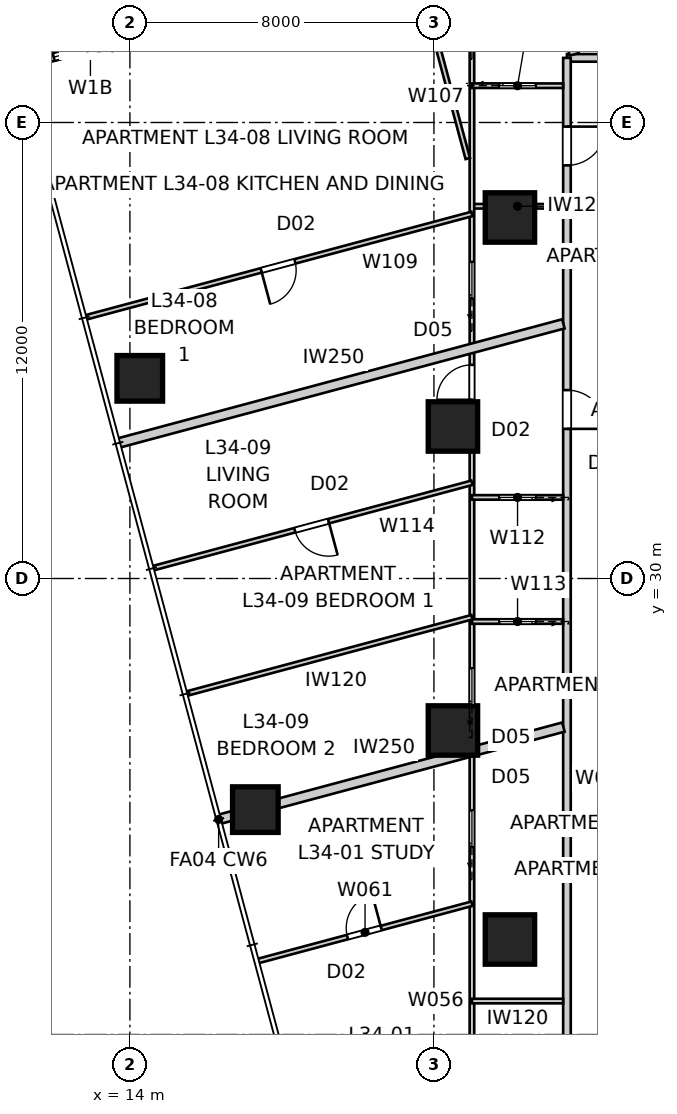
"""IFC4 building model, lengths in metres.
Left out: names, types, materials, properties, quantities, classifications, styles, units other than length and angle.
Written with IfcOpenShell. Run it as: python <this file> out.ifc"""

import sys

from ifc_helpers import new_model, si_unit, direction, frame, frame_2d, origin, origin_2d, place, context, subcontext, project, spatial, rectangle, extrude, element, fill, save


model = new_model("IFC4")
c1 = context("Model", 3, precision=1e-05, world=origin(), true_north=direction((0.0, 1.0)))
c2 = subcontext(c1, "Body", "Model", "MODEL_VIEW")
j1 = project(units=[si_unit("LENGTHUNIT", "METRE"), si_unit("PLANEANGLEUNIT", "RADIAN")], contexts=[c1])
p1 = place(None, origin())
s1 = spatial("IfcSite", under=j1, at=p1, CompositionType="ELEMENT")
p2 = place(p1, origin())
s2 = spatial("IfcBuilding", under=s1, at=p2, CompositionType="ELEMENT")
p3 = place(p2, frame((0.0, 0.0, 125.2)))
s3 = spatial("IfcBuildingStorey", under=s2, at=p3, CompositionType="ELEMENT", Elevation=125.2)
for number, where, z_axis, x_axis in (
    (1, (14.26, 35.267, 0.0), (0.0, 0.0, 1.0), (1.0, 0.0, 0.0)),
    (2, (17.301, 23.918, 0.0), (0.0, 0.0, 1.0), (1.0, 0.0, 0.0)),
):
    element("IfcColumn", number, at=place(p3, frame(where, z_axis=z_axis, x_axis=x_axis)), inside=s3, PredefinedType="COLUMN", context=c2, shape_type="SweptSolid", body=[
        extrude(rectangle(XDim=1.2, YDim=1.2, at=origin_2d()), origin(), (0.0, 0.0, 1.0), 3.4),
    ])
for number, where, z_axis, x_axis in (
    (3, (24.0, 39.5, 0.0), (0.0, 0.0, 1.0), (1.0, 0.0, 0.0)),
    (4, (22.5, 34.0, 0.0), (0.0, 0.0, 1.0), (1.0, 0.0, 0.0)),
    (5, (22.5, 26.0, 0.0), (0.0, 0.0, 1.0), (1.0, 0.0, 0.0)),
    (6, (24.0, 20.5, 0.0), (0.0, 0.0, 1.0), (1.0, 0.0, 0.0)),
):
    element("IfcColumn", number, at=place(p3, frame(where, z_axis=z_axis, x_axis=x_axis)), inside=s3, PredefinedType="COLUMN", context=c2, shape_type="SweptSolid", body=[
        extrude(rectangle(XDim=1.3, YDim=1.3, at=origin_2d()), origin(), (0.0, 0.0, 1.0), 3.4),
    ])
p4 = place(p3, frame((14.893, 44.496, 0.0), z_axis=(0.0, 0.0, 1.0), x_axis=(-0.965934430412, -0.258786931944, 0.0)))
e7 = element("IfcWall", 7, at=p4, inside=s3, PredefinedType="SOLIDWALL", context=c2, shape_type="SweptSolid", body=[
    extrude(rectangle(XDim=4.0, YDim=0.2, at=frame_2d((2.0, 0.0))), origin(), (0.0, 0.0, 1.0), 3.25),
])
p5 = place(p4, frame((1.0, 0.0, 0.45)))
e8 = element("IfcOpeningElement", 8, at=p5, cuts=e7, PredefinedType="OPENING", context=c2, shape_type="SweptSolid", body=[
    extrude(rectangle(XDim=2.0, YDim=1.8, at=frame_2d((1.0, 0.9))), frame((0.0, 0.11, 0.0), z_axis=(0.0, -1.0, 0.0), x_axis=(1.0, 0.0, 0.0)), (0.0, 0.0, 1.0), 0.22),
])
p6 = place(p3, frame((52.52, 43.7, 0.0), z_axis=(0.0, 0.0, 1.0), x_axis=(-1.0, 0.0, 0.0)))
e9 = element("IfcWall", 9, at=p6, inside=s3, PredefinedType="PARTITIONING", context=c2, shape_type="SweptSolid", body=[
    extrude(rectangle(XDim=27.02, YDim=0.2, at=frame_2d((13.51, 0.0))), origin(), (0.0, 0.0, 1.0), 3.25),
])
p7 = place(p6, frame((22.208, 0.0, 0.0)))
e10 = element("IfcOpeningElement", 10, at=p7, cuts=e9, PredefinedType="OPENING", context=c2, shape_type="SweptSolid", body=[
    extrude(rectangle(XDim=1.02, YDim=2.34, at=frame_2d((0.51, 1.17))), frame((0.0, 0.11, 0.0), z_axis=(0.0, -1.0, 0.0), x_axis=(1.0, 0.0, 0.0)), (0.0, 0.0, 1.0), 0.22),
])
p8 = place(p6, frame((1.856, 0.0, 0.0)))
e11 = element("IfcOpeningElement", 11, at=p8, cuts=e9, PredefinedType="OPENING", context=c2, shape_type="SweptSolid", body=[
    extrude(rectangle(XDim=1.02, YDim=2.34, at=frame_2d((0.51, 1.17))), frame((0.0, 0.11, 0.0), z_axis=(0.0, -1.0, 0.0), x_axis=(1.0, 0.0, 0.0)), (0.0, 0.0, 1.0), 0.22),
])
p9 = place(p3, frame((25.5, 43.7, 0.0), z_axis=(0.0, 0.0, 1.0), x_axis=(0.0, -1.0, 0.0)))
e12 = element("IfcWall", 12, at=p9, inside=s3, PredefinedType="PARTITIONING", context=c2, shape_type="SweptSolid", body=[
    extrude(rectangle(XDim=28.2, YDim=0.2, at=frame_2d((14.1, 0.0))), origin(), (0.0, 0.0, 1.0), 3.25),
])
p10 = place(p9, frame((8.742, 0.0, 0.0)))
e13 = element("IfcOpeningElement", 13, at=p10, cuts=e12, PredefinedType="OPENING", context=c2, shape_type="SweptSolid", body=[
    extrude(rectangle(XDim=1.02, YDim=2.34, at=frame_2d((0.51, 1.17))), frame((0.0, 0.11, 0.0), z_axis=(0.0, -1.0, 0.0), x_axis=(1.0, 0.0, 0.0)), (0.0, 0.0, 1.0), 0.22),
])
p11 = place(p9, frame((1.808, 0.0, 0.0)))
e14 = element("IfcOpeningElement", 14, at=p11, cuts=e12, PredefinedType="OPENING", context=c2, shape_type="SweptSolid", body=[
    extrude(rectangle(XDim=1.02, YDim=2.1, at=frame_2d((0.51, 1.05))), frame((0.0, 0.11, 0.0), z_axis=(0.0, -1.0, 0.0), x_axis=(1.0, 0.0, 0.0)), (0.0, 0.0, 1.0), 0.22),
])
p12 = place(p3, frame((23.758, 51.012, 0.0), z_axis=(0.0, 0.0, 1.0), x_axis=(0.258805213744, -0.965929532284, 0.0)))
e15 = element("IfcWall", 15, at=p12, inside=s3, PredefinedType="PARTITIONING", context=c2, shape_type="SweptSolid", body=[
    extrude(rectangle(XDim=7.473, YDim=0.25, at=frame_2d((3.737, 0.0))), origin(), (0.0, 0.0, 1.0), 3.25),
])
p13 = place(p3, frame((16.335, 23.659, 0.0), z_axis=(0.0, 0.0, 1.0), x_axis=(0.965927049013, 0.258814481793, 0.0)))
e16 = element("IfcWall", 16, at=p13, inside=s3, PredefinedType="PARTITIONING", context=c2, shape_type="SweptSolid", body=[
    extrude(rectangle(XDim=9.392, YDim=0.25, at=frame_2d((4.696, 0.0))), origin(), (0.0, 0.0, 1.0), 3.25),
])
p14 = place(p3, frame((13.682, 33.56, 0.0), z_axis=(0.0, 0.0, 1.0), x_axis=(0.965924438766, 0.258824223352, 0.0)))
e17 = element("IfcWall", 17, at=p14, inside=s3, PredefinedType="PARTITIONING", context=c2, shape_type="SweptSolid", body=[
    extrude(rectangle(XDim=12.138, YDim=0.25, at=frame_2d((6.069, 0.0))), origin(), (0.0, 0.0, 1.0), 3.25),
])
p15 = place(p3, frame((23.0, 14.833, 0.0), z_axis=(0.0, 0.0, 1.0), x_axis=(0.0, 1.0, 0.0)))
e18 = element("IfcWall", 18, at=p15, inside=s3, PredefinedType="PARTITIONING", context=c2, shape_type="SweptSolid", body=[
    extrude(rectangle(XDim=14.034, YDim=0.12, at=frame_2d((7.017, 0.0))), origin(), (0.0, 0.0, 1.0), 2.55),
])
p16 = place(p15, frame((11.843, 0.0, 0.0)))
e19 = element("IfcOpeningElement", 19, at=p16, cuts=e18, PredefinedType="OPENING", context=c2, shape_type="SweptSolid", body=[
    extrude(rectangle(XDim=0.96, YDim=2.1, at=frame_2d((0.48, 1.05))), frame((0.0, 0.07, 0.0), z_axis=(0.0, -1.0, 0.0), x_axis=(1.0, 0.0, 0.0)), (0.0, 0.0, 1.0), 0.14),
])
p17 = place(p15, frame((8.104, 0.0, 0.0)))
e20 = element("IfcOpeningElement", 20, at=p17, cuts=e18, PredefinedType="OPENING", context=c2, shape_type="SweptSolid", body=[
    extrude(rectangle(XDim=0.96, YDim=2.1, at=frame_2d((0.48, 1.05))), frame((0.0, 0.07, 0.0), z_axis=(0.0, -1.0, 0.0), x_axis=(1.0, 0.0, 0.0)), (0.0, 0.0, 1.0), 0.14),
])
p18 = place(p3, frame((25.4, 18.88, 0.0), z_axis=(0.0, 0.0, 1.0), x_axis=(-1.0, 0.0, 0.0)))
e21 = element("IfcWall", 21, at=p18, inside=s3, PredefinedType="PARTITIONING", context=c2, shape_type="SweptSolid", body=[
    extrude(rectangle(XDim=2.4, YDim=0.12, at=frame_2d((1.2, 0.0))), origin(), (0.0, 0.0, 1.0), 2.722),
])
p19 = place(p3, frame((17.374, 19.934, 0.0), z_axis=(0.0, 0.0, 1.0), x_axis=(0.965929528031, 0.258805229617, 0.0)))
e22 = element("IfcWall", 22, at=p19, inside=s3, PredefinedType="PARTITIONING", context=c2, shape_type="SweptSolid", body=[
    extrude(rectangle(XDim=5.824, YDim=0.12, at=frame_2d((2.912, 0.0))), origin(), (0.0, 0.0, 1.0), 3.25),
])
p20 = place(p19, frame((2.432, 0.0, 0.0)))
e23 = element("IfcOpeningElement", 23, at=p20, cuts=e22, PredefinedType="OPENING", context=c2, shape_type="SweptSolid", body=[
    extrude(rectangle(XDim=0.92, YDim=2.34, at=frame_2d((0.46, 1.17))), frame((0.0, 0.07, 0.0), z_axis=(0.0, -1.0, 0.0), x_axis=(1.0, 0.0, 0.0)), (0.0, 0.0, 1.0), 0.14),
])
p21 = place(p3, frame((25.4, 39.795, 0.0), z_axis=(0.0, 0.0, 1.0), x_axis=(-1.0, 0.0, 0.0)))
e24 = element("IfcWall", 24, at=p21, inside=s3, PredefinedType="PARTITIONING", context=c2, shape_type="SweptSolid", body=[
    extrude(rectangle(XDim=2.4, YDim=0.12, at=frame_2d((1.2, 0.0))), origin(), (0.0, 0.0, 1.0), 3.25),
])
p22 = place(p3, frame((23.0, 28.93, 0.0), z_axis=(0.0, 0.0, 1.0), x_axis=(0.0, 1.0, 0.0)))
e25 = element("IfcWall", 25, at=p22, inside=s3, PredefinedType="PARTITIONING", context=c2, shape_type="SweptSolid", body=[
    extrude(rectangle(XDim=17.27, YDim=0.12, at=frame_2d((8.635, 0.0))), origin(), (0.0, 0.0, 1.0), 2.55),
])
p23 = place(p22, frame((5.772, 0.0, 0.0)))
e26 = element("IfcOpeningElement", 26, at=p23, cuts=e25, PredefinedType="OPENING", context=c2, shape_type="SweptSolid", body=[
    extrude(rectangle(XDim=0.92, YDim=2.34, at=frame_2d((0.46, 1.17))), frame((0.0, 0.07, 0.0), z_axis=(0.0, -1.0, 0.0), x_axis=(1.0, 0.0, 0.0)), (0.0, 0.0, 1.0), 0.14),
])
p24 = place(p22, frame((15.599, 0.0, 0.0)))
e27 = element("IfcOpeningElement", 27, at=p24, cuts=e25, PredefinedType="OPENING", context=c2, shape_type="SweptSolid", body=[
    extrude(rectangle(XDim=0.96, YDim=2.1, at=frame_2d((0.48, 1.05))), frame((0.0, 0.07, 0.0), z_axis=(0.0, -1.0, 0.0), x_axis=(1.0, 0.0, 0.0)), (0.0, 0.0, 1.0), 0.14),
])
p25 = place(p22, frame((8.441, 0.0, 0.0)))
e28 = element("IfcOpeningElement", 28, at=p25, cuts=e25, PredefinedType="OPENING", context=c2, shape_type="SweptSolid", body=[
    extrude(rectangle(XDim=0.96, YDim=2.1, at=frame_2d((0.48, 1.05))), frame((0.0, 0.07, 0.0), z_axis=(0.0, -1.0, 0.0), x_axis=(1.0, 0.0, 0.0)), (0.0, 0.0, 1.0), 0.14),
])
p26 = place(p3, frame((23.0, 42.968, 0.0), z_axis=(0.0, 0.0, 1.0), x_axis=(1.0, 0.0, 0.0)))
e29 = element("IfcWall", 29, at=p26, inside=s3, PredefinedType="PARTITIONING", context=c2, shape_type="SweptSolid", body=[
    extrude(rectangle(XDim=2.4, YDim=0.12, at=frame_2d((1.2, 0.0))), origin(), (0.0, 0.0, 1.0), 3.25),
])
p27 = place(p26, frame((0.72, 0.0, 0.0)))
e30 = element("IfcOpeningElement", 30, at=p27, cuts=e29, PredefinedType="OPENING", context=c2, shape_type="SweptSolid", body=[
    extrude(rectangle(XDim=0.96, YDim=2.1, at=frame_2d((0.48, 1.05))), frame((0.0, 0.07, 0.0), z_axis=(0.0, -1.0, 0.0), x_axis=(1.0, 0.0, 0.0)), (0.0, 0.0, 1.0), 0.14),
])
p28 = place(p3, frame((23.0, 39.594, 0.0), z_axis=(0.0, 0.0, 1.0), x_axis=(-0.9659257847, -0.258819200315, 0.0)))
e31 = element("IfcWall", 31, at=p28, inside=s3, PredefinedType="PARTITIONING", context=c2, shape_type="SweptSolid", body=[
    extrude(rectangle(XDim=10.522, YDim=0.12, at=frame_2d((5.261, 0.0))), origin(), (0.0, 0.0, 1.0), 2.722),
])
p29 = place(p28, frame((4.821, 0.0, 0.0)))
e32 = element("IfcOpeningElement", 32, at=p29, cuts=e31, PredefinedType="OPENING", context=c2, shape_type="SweptSolid", body=[
    extrude(rectangle(XDim=0.92, YDim=2.34, at=frame_2d((0.46, 1.17))), frame((0.0, 0.07, 0.0), z_axis=(0.0, -1.0, 0.0), x_axis=(1.0, 0.0, 0.0)), (0.0, 0.0, 1.0), 0.14),
])
p30 = place(p3, frame((20.468, 50.089, 0.0), z_axis=(0.0, 0.0, 1.0), x_axis=(0.25881390457, -0.965927203676, 0.0)))
e33 = element("IfcWall", 33, at=p30, inside=s3, PredefinedType="PARTITIONING", context=c2, shape_type="SweptSolid", body=[
    extrude(rectangle(XDim=9.357, YDim=0.12, at=frame_2d((4.678, 0.0))), origin(), (0.0, 0.0, 1.0), 2.638),
])
p31 = place(p30, frame((4.461, 0.0, 0.0)))
e34 = element("IfcOpeningElement", 34, at=p31, cuts=e33, PredefinedType="OPENING", context=c2, shape_type="SweptSolid", body=[
    extrude(rectangle(XDim=0.92, YDim=2.34, at=frame_2d((0.46, 1.17))), frame((0.0, 0.07, 0.0), z_axis=(0.0, -1.0, 0.0), x_axis=(1.0, 0.0, 0.0)), (0.0, 0.0, 1.0), 0.14),
])
p32 = place(p30, frame((1.5, 0.0, 0.0)))
e35 = element("IfcOpeningElement", 35, at=p32, cuts=e33, PredefinedType="OPENING", context=c2, shape_type="SweptSolid", body=[
    extrude(rectangle(XDim=0.92, YDim=2.34, at=frame_2d((0.46, 1.17))), frame((0.0, 0.07, 0.0), z_axis=(0.0, -1.0, 0.0), x_axis=(1.0, 0.0, 0.0)), (0.0, 0.0, 1.0), 0.14),
])
p33 = place(p3, frame((25.4, 32.134, 0.0), z_axis=(0.0, 0.0, 1.0), x_axis=(-1.0, 0.0, 0.0)))
e36 = element("IfcWall", 36, at=p33, inside=s3, PredefinedType="PARTITIONING", context=c2, shape_type="SweptSolid", body=[
    extrude(rectangle(XDim=2.4, YDim=0.12, at=frame_2d((1.2, 0.0))), origin(), (0.0, 0.0, 1.0), 3.25),
])
p34 = place(p33, frame((0.72, 0.0, 0.0)))
e37 = element("IfcOpeningElement", 37, at=p34, cuts=e36, PredefinedType="OPENING", context=c2, shape_type="SweptSolid", body=[
    extrude(rectangle(XDim=0.96, YDim=2.1, at=frame_2d((0.48, 1.05))), frame((0.0, 0.07, 0.0), z_axis=(0.0, -1.0, 0.0), x_axis=(1.0, 0.0, 0.0)), (0.0, 0.0, 1.0), 0.14),
])
p35 = place(p3, frame((25.4, 28.868, 0.0), z_axis=(0.0, 0.0, 1.0), x_axis=(-1.0, 0.0, 0.0)))
e38 = element("IfcWall", 38, at=p35, inside=s3, PredefinedType="PARTITIONING", context=c2, shape_type="SweptSolid", body=[
    extrude(rectangle(XDim=2.4, YDim=0.12, at=frame_2d((1.2, 0.0))), origin(), (0.0, 0.0, 1.0), 3.25),
])
p36 = place(p35, frame((0.72, 0.0, 0.0)))
e39 = element("IfcOpeningElement", 39, at=p36, cuts=e38, PredefinedType="OPENING", context=c2, shape_type="SweptSolid", body=[
    extrude(rectangle(XDim=0.96, YDim=2.1, at=frame_2d((0.48, 1.05))), frame((0.0, 0.07, 0.0), z_axis=(0.0, -1.0, 0.0), x_axis=(1.0, 0.0, 0.0)), (0.0, 0.0, 1.0), 0.14),
])
p37 = place(p3, frame((23.0, 32.519, 0.0), z_axis=(0.0, 0.0, 1.0), x_axis=(-0.965925607751, -0.258819860698, 0.0)))
e40 = element("IfcWall", 40, at=p37, inside=s3, PredefinedType="PARTITIONING", context=c2, shape_type="SweptSolid", body=[
    extrude(rectangle(XDim=8.691, YDim=0.12, at=frame_2d((4.346, 0.0))), origin(), (0.0, 0.0, 1.0), 3.25),
])
p38 = place(p37, frame((3.906, 0.0, 0.0)))
e41 = element("IfcOpeningElement", 41, at=p38, cuts=e40, PredefinedType="OPENING", context=c2, shape_type="SweptSolid", body=[
    extrude(rectangle(XDim=0.92, YDim=2.34, at=frame_2d((0.46, 1.17))), frame((0.0, 0.07, 0.0), z_axis=(0.0, -1.0, 0.0), x_axis=(1.0, 0.0, 0.0)), (0.0, 0.0, 1.0), 0.14),
])
p39 = place(p3, frame((23.0, 28.982, 0.0), z_axis=(0.0, 0.0, 1.0), x_axis=(-0.965927309482, -0.258813509689, 0.0)))
e42 = element("IfcWall", 42, at=p39, inside=s3, PredefinedType="PARTITIONING", context=c2, shape_type="SweptSolid", body=[
    extrude(rectangle(XDim=7.776, YDim=0.12, at=frame_2d((3.888, 0.0))), origin(), (0.0, 0.0, 1.0), 3.25),
])
p40 = place(p5, origin())
e43 = element("IfcWindow", 43, at=p40, inside=s3, PartitioningType="SINGLE_PANEL", PredefinedType="WINDOW", context=c2, shape_type="SweptSolid", body=[
    extrude(rectangle(XDim=2.0, YDim=1.8, at=frame_2d((1.0, 0.9))), frame((0.0, 0.03, 0.0), z_axis=(0.0, -1.0, 0.0), x_axis=(1.0, 0.0, 0.0)), (0.0, 0.0, 1.0), 0.06),
])
fill(e8, e43)
p41 = place(p10, origin())
e44 = element("IfcDoor", 44, at=p41, inside=s3, OperationType="SINGLE_SWING_RIGHT", PredefinedType="DOOR", context=c2, shape_type="SweptSolid", body=[
    extrude(rectangle(XDim=1.02, YDim=2.34, at=frame_2d((0.51, 1.17))), frame((0.0, 0.025, 0.0), z_axis=(0.0, -1.0, 0.0), x_axis=(1.0, 0.0, 0.0)), (0.0, 0.0, 1.0), 0.05),
])
fill(e13, e44)
p42 = place(p11, origin())
e45 = element("IfcDoor", 45, at=p42, inside=s3, OperationType="SINGLE_SWING_LEFT", PredefinedType="DOOR", context=c2, shape_type="SweptSolid", body=[
    extrude(rectangle(XDim=1.02, YDim=2.1, at=frame_2d((0.51, 1.05))), frame((0.0, 0.025, 0.0), z_axis=(0.0, -1.0, 0.0), x_axis=(1.0, 0.0, 0.0)), (0.0, 0.0, 1.0), 0.05),
])
fill(e14, e45)
p43 = place(p23, origin())
e46 = element("IfcDoor", 46, at=p43, inside=s3, OperationType="SINGLE_SWING_LEFT", PredefinedType="DOOR", context=c2, shape_type="SweptSolid", body=[
    extrude(rectangle(XDim=0.92, YDim=2.34, at=frame_2d((0.46, 1.17))), frame((0.0, 0.025, 0.0), z_axis=(0.0, -1.0, 0.0), x_axis=(1.0, 0.0, 0.0)), (0.0, 0.0, 1.0), 0.05),
])
fill(e26, e46)
p44 = place(p34, origin())
e47 = element("IfcDoor", 47, at=p44, inside=s3, OperationType="SLIDING_TO_LEFT", PredefinedType="DOOR", context=c2, shape_type="SweptSolid", body=[
    extrude(rectangle(XDim=0.96, YDim=2.1, at=frame_2d((0.48, 1.05))), frame((0.0, 0.025, 0.0), z_axis=(0.0, -1.0, 0.0), x_axis=(1.0, 0.0, 0.0)), (0.0, 0.0, 1.0), 0.05),
])
fill(e37, e47)
p45 = place(p27, origin())
e48 = element("IfcDoor", 48, at=p45, inside=s3, OperationType="SLIDING_TO_LEFT", PredefinedType="DOOR", context=c2, shape_type="SweptSolid", body=[
    extrude(rectangle(XDim=0.96, YDim=2.1, at=frame_2d((0.48, 1.05))), frame((0.0, 0.025, 0.0), z_axis=(0.0, -1.0, 0.0), x_axis=(1.0, 0.0, 0.0)), (0.0, 0.0, 1.0), 0.05),
])
fill(e30, e48)
p46 = place(p38, origin())
e49 = element("IfcDoor", 49, at=p46, inside=s3, OperationType="SINGLE_SWING_LEFT", PredefinedType="DOOR", context=c2, shape_type="SweptSolid", body=[
    extrude(rectangle(XDim=0.92, YDim=2.34, at=frame_2d((0.46, 1.17))), frame((0.0, 0.025, 0.0), z_axis=(0.0, -1.0, 0.0), x_axis=(1.0, 0.0, 0.0)), (0.0, 0.0, 1.0), 0.05),
])
fill(e41, e49)
p47 = place(p36, origin())
e50 = element("IfcDoor", 50, at=p47, inside=s3, OperationType="SLIDING_TO_LEFT", PredefinedType="DOOR", context=c2, shape_type="SweptSolid", body=[
    extrude(rectangle(XDim=0.96, YDim=2.1, at=frame_2d((0.48, 1.05))), frame((0.0, 0.025, 0.0), z_axis=(0.0, -1.0, 0.0), x_axis=(1.0, 0.0, 0.0)), (0.0, 0.0, 1.0), 0.05),
])
fill(e39, e50)
p48 = place(p16, origin())
e51 = element("IfcDoor", 51, at=p48, inside=s3, OperationType="SLIDING_TO_LEFT", PredefinedType="DOOR", context=c2, shape_type="SweptSolid", body=[
    extrude(rectangle(XDim=0.96, YDim=2.1, at=frame_2d((0.48, 1.05))), frame((0.0, 0.025, 0.0), z_axis=(0.0, -1.0, 0.0), x_axis=(1.0, 0.0, 0.0)), (0.0, 0.0, 1.0), 0.05),
])
fill(e19, e51)
p49 = place(p20, origin())
e52 = element("IfcDoor", 52, at=p49, inside=s3, OperationType="SINGLE_SWING_RIGHT", PredefinedType="DOOR", context=c2, shape_type="SweptSolid", body=[
    extrude(rectangle(XDim=0.92, YDim=2.34, at=frame_2d((0.46, 1.17))), frame((0.0, 0.025, 0.0), z_axis=(0.0, -1.0, 0.0), x_axis=(1.0, 0.0, 0.0)), (0.0, 0.0, 1.0), 0.05),
])
fill(e23, e52)
p50 = place(p17, origin())
e53 = element("IfcDoor", 53, at=p50, inside=s3, OperationType="SLIDING_TO_LEFT", PredefinedType="DOOR", context=c2, shape_type="SweptSolid", body=[
    extrude(rectangle(XDim=0.96, YDim=2.1, at=frame_2d((0.48, 1.05))), frame((0.0, 0.025, 0.0), z_axis=(0.0, -1.0, 0.0), x_axis=(1.0, 0.0, 0.0)), (0.0, 0.0, 1.0), 0.05),
])
fill(e20, e53)
p51 = place(p29, origin())
e54 = element("IfcDoor", 54, at=p51, inside=s3, OperationType="SINGLE_SWING_RIGHT", PredefinedType="DOOR", context=c2, shape_type="SweptSolid", body=[
    extrude(rectangle(XDim=0.92, YDim=2.34, at=frame_2d((0.46, 1.17))), frame((0.0, 0.025, 0.0), z_axis=(0.0, -1.0, 0.0), x_axis=(1.0, 0.0, 0.0)), (0.0, 0.0, 1.0), 0.05),
])
fill(e32, e54)
p52 = place(p25, origin())
e55 = element("IfcDoor", 55, at=p52, inside=s3, OperationType="SLIDING_TO_LEFT", PredefinedType="DOOR", context=c2, shape_type="SweptSolid", body=[
    extrude(rectangle(XDim=0.96, YDim=2.1, at=frame_2d((0.48, 1.05))), frame((0.0, 0.025, 0.0), z_axis=(0.0, -1.0, 0.0), x_axis=(1.0, 0.0, 0.0)), (0.0, 0.0, 1.0), 0.05),
])
fill(e28, e55)
save(model, sys.argv[1])
